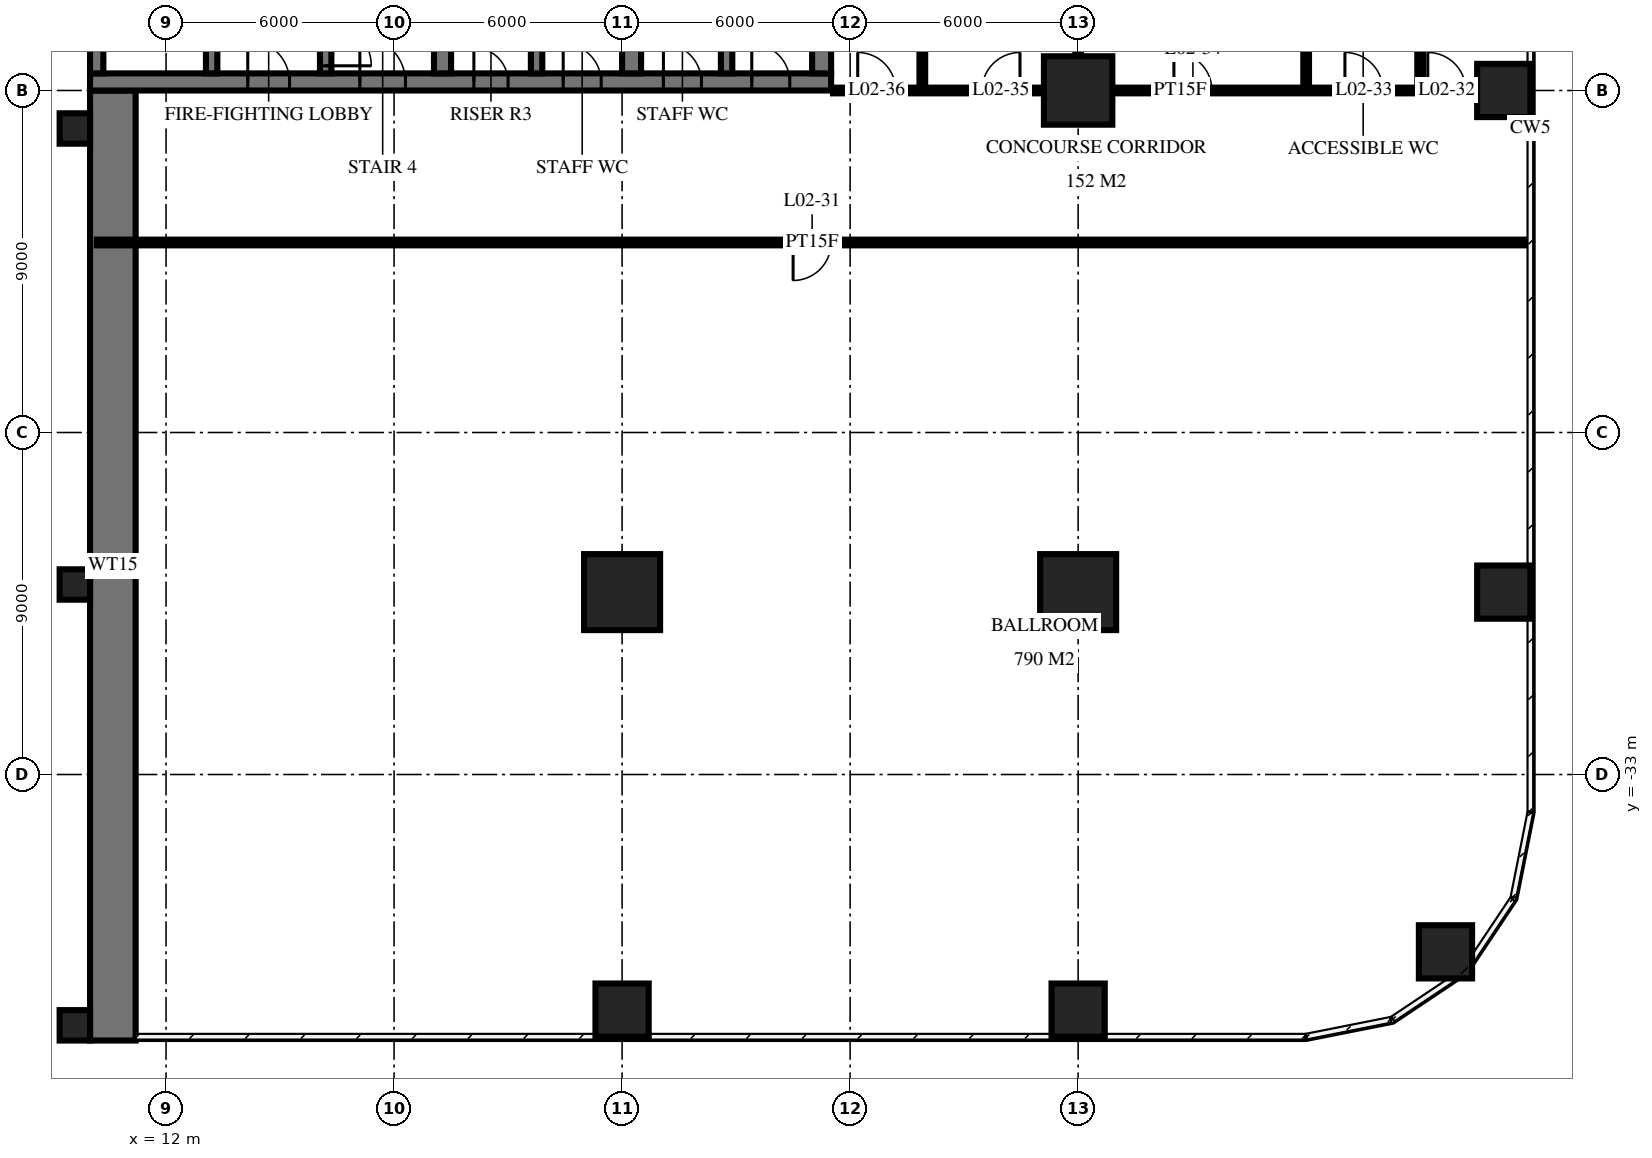
"""IFC4 building model, lengths in metres.
Left out: names, types, materials, properties, quantities, classifications, styles, units other than length and angle.
Written with IfcOpenShell. Run it as: python <this file> out.ifc"""

import sys

from ifc_helpers import new_model, si_unit, direction, frame, frame_2d, origin, origin_2d, place, context, subcontext, project, spatial, rectangle, circle, extrude, element, fill, save


model = new_model("IFC4")
c1 = context("Model", 3, precision=1e-05, world=origin(), true_north=direction((0.0, 1.0)))
c2 = subcontext(c1, "Body", "Model", "MODEL_VIEW")
j1 = project(units=[si_unit("LENGTHUNIT", "METRE"), si_unit("PLANEANGLEUNIT", "RADIAN")], contexts=[c1])
p1 = place(None, origin())
s1 = spatial("IfcSite", under=j1, at=p1, CompositionType="ELEMENT")
p2 = place(p1, origin())
s2 = spatial("IfcBuilding", under=s1, at=p2, CompositionType="ELEMENT")
p3 = place(p2, frame((0.0, 0.0, 12.5)))
s3 = spatial("IfcBuildingStorey", under=s2, at=p3, CompositionType="ELEMENT", Elevation=12.5)
p4 = place(p3, frame((24.0, -39.2, 0.0), z_axis=(0.0, 0.0, 1.0), x_axis=(1.0, 0.0, 0.0)))
e1 = element("IfcColumn", 1, at=p4, inside=s3, PredefinedType="COLUMN", context=c2, shape_type="SweptSolid", body=[
    extrude(circle(Radius=0.7, at=origin_2d()), origin(), (0.0, 0.0, 1.0), 5.5),
])
p5 = place(p3, frame((24.0, -28.2, 0.0), z_axis=(0.0, 0.0, 1.0), x_axis=(1.0, 0.0, 0.0)))
e2 = element("IfcColumn", 2, at=p5, inside=s3, PredefinedType="COLUMN", context=c2, shape_type="SweptSolid", body=[
    extrude(circle(Radius=1.0, at=origin_2d()), origin(), (0.0, 0.0, 1.0), 5.5),
])
p6 = place(p3, frame((36.0, -39.2, 0.0), z_axis=(0.0, 0.0, 1.0), x_axis=(1.0, 0.0, 0.0)))
e3 = element("IfcColumn", 3, at=p6, inside=s3, PredefinedType="COLUMN", context=c2, shape_type="SweptSolid", body=[
    extrude(circle(Radius=0.7, at=origin_2d()), origin(), (0.0, 0.0, 1.0), 5.5),
])
p7 = place(p3, frame((36.0, -28.2, 0.0), z_axis=(0.0, 0.0, 1.0), x_axis=(1.0, 0.0, 0.0)))
e4 = element("IfcColumn", 4, at=p7, inside=s3, PredefinedType="COLUMN", context=c2, shape_type="SweptSolid", body=[
    extrude(circle(Radius=1.0, at=origin_2d()), origin(), (0.0, 0.0, 1.0), 5.5),
])
p8 = place(p3, frame((36.0, -15.0, 0.0), z_axis=(0.0, 0.0, 1.0), x_axis=(1.0, 0.0, 0.0)))
e5 = element("IfcColumn", 5, at=p8, inside=s3, PredefinedType="COLUMN", context=c2, shape_type="SweptSolid", body=[
    extrude(circle(Radius=0.9, at=origin_2d()), origin(), (0.0, 0.0, 1.0), 5.5),
])
for number, where, z_axis, x_axis in (
    (6, (45.666, -37.666, 0.0), (0.0, 0.0, 1.0), (1.0, 0.0, 0.0)),
    (7, (47.2, -28.2, 0.0), (0.0, 0.0, 1.0), (1.0, 0.0, 0.0)),
    (8, (47.2, -15.0, 0.0), (0.0, 0.0, 1.0), (1.0, 0.0, 0.0)),
):
    element("IfcColumn", number, at=place(p3, frame(where, z_axis=z_axis, x_axis=x_axis)), inside=s3, PredefinedType="COLUMN", context=c2, shape_type="SweptSolid", body=[
        extrude(circle(Radius=0.7, at=origin_2d()), origin(), (0.0, 0.0, 1.0), 5.5),
    ])
p9 = place(p3, frame((10.0, -14.775, 0.0), z_axis=(0.0, 0.0, 1.0), x_axis=(1.0, 0.0, 0.0)))
e9 = element("IfcWall", 9, at=p9, inside=s3, PredefinedType="SHEAR", context=c2, shape_type="SweptSolid", body=[
    extrude(rectangle(XDim=19.5, YDim=0.45, at=frame_2d((9.75, 0.0))), origin(), (0.0, 0.0, 1.0), 5.5),
])
p10 = place(p9, frame((7.1, 0.0, 0.0)))
e10 = element("IfcOpeningElement", 10, at=p10, cuts=e9, PredefinedType="OPENING", context=c2, shape_type="SweptSolid", body=[
    extrude(rectangle(XDim=1.2, YDim=2.1, at=frame_2d((0.6, 1.05))), frame((0.0, 0.235, 0.0), z_axis=(0.0, -1.0, 0.0), x_axis=(1.0, 0.0, 0.0)), (0.0, 0.0, 1.0), 0.47),
])
p11 = place(p9, frame((4.15, 0.0, 0.0)))
e11 = element("IfcOpeningElement", 11, at=p11, cuts=e9, PredefinedType="OPENING", context=c2, shape_type="SweptSolid", body=[
    extrude(rectangle(XDim=1.1, YDim=2.1, at=frame_2d((0.55, 1.05))), frame((0.0, 0.235, 0.0), z_axis=(0.0, -1.0, 0.0), x_axis=(1.0, 0.0, 0.0)), (0.0, 0.0, 1.0), 0.47),
])
p12 = place(p9, frame((10.1, 0.0, 0.0)))
e12 = element("IfcOpeningElement", 12, at=p12, cuts=e9, PredefinedType="OPENING", context=c2, shape_type="SweptSolid", body=[
    extrude(rectangle(XDim=0.9, YDim=2.1, at=frame_2d((0.45, 1.05))), frame((0.0, 0.235, 0.0), z_axis=(0.0, -1.0, 0.0), x_axis=(1.0, 0.0, 0.0)), (0.0, 0.0, 1.0), 0.47),
])
p13 = place(p9, frame((12.45, 0.0, 0.0)))
e13 = element("IfcOpeningElement", 13, at=p13, cuts=e9, PredefinedType="OPENING", context=c2, shape_type="SweptSolid", body=[
    extrude(rectangle(XDim=1.0, YDim=2.1, at=frame_2d((0.5, 1.05))), frame((0.0, 0.235, 0.0), z_axis=(0.0, -1.0, 0.0), x_axis=(1.0, 0.0, 0.0)), (0.0, 0.0, 1.0), 0.47),
])
p14 = place(p9, frame((15.087, 0.0, 0.0)))
e14 = element("IfcOpeningElement", 14, at=p14, cuts=e9, PredefinedType="OPENING", context=c2, shape_type="SweptSolid", body=[
    extrude(rectangle(XDim=1.0, YDim=2.1, at=frame_2d((0.5, 1.05))), frame((0.0, 0.235, 0.0), z_axis=(0.0, -1.0, 0.0), x_axis=(1.0, 0.0, 0.0)), (0.0, 0.0, 1.0), 0.47),
])
p15 = place(p9, frame((17.413, 0.0, 0.0)))
e15 = element("IfcOpeningElement", 15, at=p15, cuts=e9, PredefinedType="OPENING", context=c2, shape_type="SweptSolid", body=[
    extrude(rectangle(XDim=1.0, YDim=2.1, at=frame_2d((0.5, 1.05))), frame((0.0, 0.235, 0.0), z_axis=(0.0, -1.0, 0.0), x_axis=(1.0, 0.0, 0.0)), (0.0, 0.0, 1.0), 0.47),
])
p16 = place(p3, frame((10.175, -14.55, 0.0), z_axis=(0.0, 0.0, 1.0), x_axis=(0.0, 1.0, 0.0)))
e16 = element("IfcWall", 16, at=p16, inside=s3, PredefinedType="SHEAR", context=c2, shape_type="SweptSolid", body=[
    extrude(rectangle(XDim=14.1, YDim=0.35, at=frame_2d((7.05, 0.0))), origin(), (0.0, 0.0, 1.0), 5.5),
])
p17 = place(p3, frame((29.25, -14.55, 0.0), z_axis=(0.0, 0.0, 1.0), x_axis=(0.0, 1.0, 0.0)))
e17 = element("IfcWall", 17, at=p17, inside=s3, PredefinedType="SHEAR", context=c2, shape_type="SweptSolid", body=[
    extrude(rectangle(XDim=14.1, YDim=0.5, at=frame_2d((7.05, 0.0))), origin(), (0.0, 0.0, 1.0), 5.5),
])
p18 = place(p17, frame((8.4, 0.0, 0.0)))
e18 = element("IfcOpeningElement", 18, at=p18, cuts=e17, PredefinedType="OPENING", context=c2, shape_type="SweptSolid", body=[
    extrude(rectangle(XDim=1.4, YDim=2.4, at=frame_2d((0.7, 1.2))), frame((0.0, 0.26, 0.0), z_axis=(0.0, -1.0, 0.0), x_axis=(1.0, 0.0, 0.0)), (0.0, 0.0, 1.0), 0.52),
])
p19 = place(p17, frame((10.0, 0.0, 0.0)))
e19 = element("IfcOpeningElement", 19, at=p19, cuts=e17, PredefinedType="OPENING", context=c2, shape_type="SweptSolid", body=[
    extrude(rectangle(XDim=1.4, YDim=2.4, at=frame_2d((0.7, 1.2))), frame((0.0, 0.26, 0.0), z_axis=(0.0, -1.0, 0.0), x_axis=(1.0, 0.0, 0.0)), (0.0, 0.0, 1.0), 0.52),
])
p20 = place(p3, frame((13.2, -14.55, 0.0), z_axis=(0.0, 0.0, 1.0), x_axis=(0.0, 1.0, 0.0)))
e20 = element("IfcWall", 20, at=p20, inside=s3, PredefinedType="SHEAR", context=c2, shape_type="SweptSolid", body=[
    extrude(rectangle(XDim=5.4, YDim=0.3, at=frame_2d((2.7, 0.0))), origin(), (0.0, 0.0, 1.0), 5.5),
])
p21 = place(p20, frame((4.0, 0.0, 0.0)))
e21 = element("IfcOpeningElement", 21, at=p21, cuts=e20, PredefinedType="OPENING", context=c2, shape_type="SweptSolid", body=[
    extrude(rectangle(XDim=1.2, YDim=2.1, at=frame_2d((0.6, 1.05))), frame((0.0, 0.16, 0.0), z_axis=(0.0, -1.0, 0.0), x_axis=(1.0, 0.0, 0.0)), (0.0, 0.0, 1.0), 0.32),
])
p22 = place(p3, frame((16.2, -14.55, 0.0), z_axis=(0.0, 0.0, 1.0), x_axis=(0.0, 1.0, 0.0)))
e22 = element("IfcWall", 22, at=p22, inside=s3, PredefinedType="SHEAR", context=c2, shape_type="SweptSolid", body=[
    extrude(rectangle(XDim=5.4, YDim=0.3, at=frame_2d((2.7, 0.0))), origin(), (0.0, 0.0, 1.0), 5.5),
])
p23 = place(p22, frame((0.2, 0.0, 0.0)))
e23 = element("IfcOpeningElement", 23, at=p23, cuts=e22, PredefinedType="OPENING", context=c2, shape_type="SweptSolid", body=[
    extrude(rectangle(XDim=1.2, YDim=2.1, at=frame_2d((0.6, 1.05))), frame((0.0, 0.16, 0.0), z_axis=(0.0, -1.0, 0.0), x_axis=(1.0, 0.0, 0.0)), (0.0, 0.0, 1.0), 0.32),
])
p24 = place(p3, frame((19.275, -14.55, 0.0), z_axis=(0.0, 0.0, 1.0), x_axis=(0.0, 1.0, 0.0)))
e24 = element("IfcWall", 24, at=p24, inside=s3, PredefinedType="SHEAR", context=c2, shape_type="SweptSolid", body=[
    extrude(rectangle(XDim=5.4, YDim=0.45, at=frame_2d((2.7, 0.0))), origin(), (0.0, 0.0, 1.0), 5.5),
])
p25 = place(p3, frame((21.75, -14.55, 0.0), z_axis=(0.0, 0.0, 1.0), x_axis=(0.0, 1.0, 0.0)))
e25 = element("IfcWall", 25, at=p25, inside=s3, PredefinedType="SHEAR", context=c2, shape_type="SweptSolid", body=[
    extrude(rectangle(XDim=5.4, YDim=0.3, at=frame_2d((2.7, 0.0))), origin(), (0.0, 0.0, 1.0), 5.5),
])
p26 = place(p3, frame((24.25, -14.55, 0.0), z_axis=(0.0, 0.0, 1.0), x_axis=(0.0, 1.0, 0.0)))
e26 = element("IfcWall", 26, at=p26, inside=s3, PredefinedType="SHEAR", context=c2, shape_type="SweptSolid", body=[
    extrude(rectangle(XDim=5.4, YDim=0.5, at=frame_2d((2.7, 0.0))), origin(), (0.0, 0.0, 1.0), 5.5),
])
p27 = place(p3, frame((26.75, -14.55, 0.0), z_axis=(0.0, 0.0, 1.0), x_axis=(0.0, 1.0, 0.0)))
e27 = element("IfcWall", 27, at=p27, inside=s3, PredefinedType="SHEAR", context=c2, shape_type="SweptSolid", body=[
    extrude(rectangle(XDim=5.4, YDim=0.3, at=frame_2d((2.7, 0.0))), origin(), (0.0, 0.0, 1.0), 5.5),
])
p28 = place(p3, frame((10.6, -40.0, 0.0), z_axis=(0.0, 0.0, 1.0), x_axis=(0.0, 1.0, 0.0)))
e28 = element("IfcWall", 28, at=p28, inside=s3, PredefinedType="SHEAR", context=c2, shape_type="SweptSolid", body=[
    extrude(rectangle(XDim=25.0, YDim=1.2, at=frame_2d((12.5, 0.0))), origin(), (0.0, 0.0, 1.0), 5.5),
])
for number, where, z_axis, x_axis in (
    (29, (9.6, -39.6, 0.0), (0.0, 0.0, 1.0), (1.0, 0.0, 0.0)),
    (30, (9.6, -28.0, 0.0), (0.0, 0.0, 1.0), (1.0, 0.0, 0.0)),
    (31, (9.6, -16.0, 0.0), (0.0, 0.0, 1.0), (1.0, 0.0, 0.0)),
):
    element("IfcColumn", number, at=place(p3, frame(where, z_axis=z_axis, x_axis=x_axis)), inside=s3, PredefinedType="COLUMN", context=c2, shape_type="SweptSolid", body=[
        extrude(rectangle(XDim=0.8, YDim=0.8, at=origin_2d()), origin(), (0.0, 0.0, 1.0), 4.25),
    ])
p29 = place(p3, frame((45.0, -15.0, 0.0), z_axis=(0.0, 0.0, 1.0), x_axis=(0.0, 1.0, 0.0)))
e32 = element("IfcWall", 32, at=p29, inside=s3, PredefinedType="PLUMBINGWALL", context=c2, shape_type="SweptSolid", body=[
    extrude(rectangle(XDim=6.0, YDim=0.15, at=frame_2d((3.0, 0.0))), origin(), (0.0, 0.0, 1.0), 5.05),
])
p30 = place(p3, frame((42.0, -15.0, 0.0), z_axis=(0.0, 0.0, 1.0), x_axis=(0.0, 1.0, 0.0)))
e33 = element("IfcWall", 33, at=p30, inside=s3, PredefinedType="PLUMBINGWALL", context=c2, shape_type="SweptSolid", body=[
    extrude(rectangle(XDim=4.5, YDim=0.15, at=frame_2d((2.25, 0.0))), origin(), (0.0, 0.0, 1.0), 5.05),
])
p31 = place(p3, frame((36.0, -15.0, 0.0), z_axis=(0.0, 0.0, 1.0), x_axis=(0.0, 1.0, 0.0)))
e34 = element("IfcWall", 34, at=p31, inside=s3, PredefinedType="PARTITIONING", context=c2, shape_type="SweptSolid", body=[
    extrude(rectangle(XDim=22.82, YDim=0.15, at=frame_2d((11.41, 0.0))), origin(), (0.0, 0.0, 1.0), 5.05),
])
p32 = place(p3, frame((31.9, -15.0, 0.0), z_axis=(0.0, 0.0, 1.0), x_axis=(0.0, 1.0, 0.0)))
e35 = element("IfcWall", 35, at=p32, inside=s3, PredefinedType="PARTITIONING", context=c2, shape_type="SweptSolid", body=[
    extrude(rectangle(XDim=12.5, YDim=0.15, at=frame_2d((6.25, 0.0))), origin(), (0.0, 0.0, 1.0), 5.05),
])
p33 = place(p3, frame((10.18, -19.0, 0.0), z_axis=(0.0, 0.0, 1.0), x_axis=(1.0, 0.0, 0.0)))
e36 = element("IfcWall", 36, at=p33, inside=s3, PredefinedType="PARTITIONING", context=c2, shape_type="SweptSolid", body=[
    extrude(rectangle(XDim=37.64, YDim=0.15, at=frame_2d((18.82, 0.0))), origin(), (0.0, 0.0, 1.0), 5.05),
])
p34 = place(p33, frame((18.32, 0.0, 0.0)))
e37 = element("IfcOpeningElement", 37, at=p34, cuts=e36, PredefinedType="OPENING", context=c2, shape_type="SweptSolid", body=[
    extrude(rectangle(XDim=1.0, YDim=2.1, at=frame_2d((0.5, 1.05))), frame((0.0, 0.085, 0.0), z_axis=(0.0, -1.0, 0.0), x_axis=(1.0, 0.0, 0.0)), (0.0, 0.0, 1.0), 0.17),
])
p35 = place(p3, frame((29.55, -15.0, 0.0), z_axis=(0.0, 0.0, 1.0), x_axis=(1.0, 0.0, 0.0)))
e38 = element("IfcWall", 38, at=p35, inside=s3, PredefinedType="PARTITIONING", context=c2, shape_type="SweptSolid", body=[
    extrude(rectangle(XDim=18.27, YDim=0.15, at=frame_2d((9.135, 0.0))), origin(), (0.0, 0.0, 1.0), 5.05),
])
p36 = place(p35, frame((15.65, 0.0, 0.0)))
e39 = element("IfcOpeningElement", 39, at=p36, cuts=e38, PredefinedType="OPENING", context=c2, shape_type="SweptSolid", body=[
    extrude(rectangle(XDim=1.0, YDim=2.1, at=frame_2d((0.5, 1.05))), frame((0.0, 0.085, 0.0), z_axis=(0.0, -1.0, 0.0), x_axis=(1.0, 0.0, 0.0)), (0.0, 0.0, 1.0), 0.17),
])
p37 = place(p35, frame((13.47, 0.0, 0.0)))
e40 = element("IfcOpeningElement", 40, at=p37, cuts=e38, PredefinedType="OPENING", context=c2, shape_type="SweptSolid", body=[
    extrude(rectangle(XDim=1.0, YDim=2.1, at=frame_2d((0.5, 1.05))), frame((0.0, 0.085, 0.0), z_axis=(0.0, -1.0, 0.0), x_axis=(1.0, 0.0, 0.0)), (0.0, 0.0, 1.0), 0.17),
])
p38 = place(p35, frame((8.97, 0.0, 0.0)))
e41 = element("IfcOpeningElement", 41, at=p38, cuts=e38, PredefinedType="OPENING", context=c2, shape_type="SweptSolid", body=[
    extrude(rectangle(XDim=1.0, YDim=2.1, at=frame_2d((0.5, 1.05))), frame((0.0, 0.085, 0.0), z_axis=(0.0, -1.0, 0.0), x_axis=(1.0, 0.0, 0.0)), (0.0, 0.0, 1.0), 0.17),
])
p39 = place(p35, frame((3.92, 0.0, 0.0)))
e42 = element("IfcOpeningElement", 42, at=p39, cuts=e38, PredefinedType="OPENING", context=c2, shape_type="SweptSolid", body=[
    extrude(rectangle(XDim=1.0, YDim=2.1, at=frame_2d((0.5, 1.05))), frame((0.0, 0.085, 0.0), z_axis=(0.0, -1.0, 0.0), x_axis=(1.0, 0.0, 0.0)), (0.0, 0.0, 1.0), 0.17),
])
p40 = place(p35, frame((0.65, 0.0, 0.0)))
e43 = element("IfcOpeningElement", 43, at=p40, cuts=e38, PredefinedType="OPENING", context=c2, shape_type="SweptSolid", body=[
    extrude(rectangle(XDim=1.0, YDim=2.1, at=frame_2d((0.5, 1.05))), frame((0.0, 0.085, 0.0), z_axis=(0.0, -1.0, 0.0), x_axis=(1.0, 0.0, 0.0)), (0.0, 0.0, 1.0), 0.17),
])
p41 = place(p10, origin())
e44 = element("IfcDoor", 44, at=p41, inside=s3, OperationType="SINGLE_SWING_RIGHT", PredefinedType="DOOR", context=c2, shape_type="SweptSolid", body=[
    extrude(rectangle(XDim=1.2, YDim=2.1, at=frame_2d((0.6, 1.05))), frame((0.0, 0.025, 0.0), z_axis=(0.0, -1.0, 0.0), x_axis=(1.0, 0.0, 0.0)), (0.0, 0.0, 1.0), 0.05),
])
fill(e10, e44)
p42 = place(p11, origin())
e45 = element("IfcDoor", 45, at=p42, inside=s3, OperationType="SINGLE_SWING_RIGHT", PredefinedType="DOOR", context=c2, shape_type="SweptSolid", body=[
    extrude(rectangle(XDim=1.1, YDim=2.1, at=frame_2d((0.55, 1.05))), frame((0.0, 0.025, 0.0), z_axis=(0.0, -1.0, 0.0), x_axis=(1.0, 0.0, 0.0)), (0.0, 0.0, 1.0), 0.05),
])
fill(e11, e45)
p43 = place(p12, origin())
e46 = element("IfcDoor", 46, at=p43, inside=s3, OperationType="SINGLE_SWING_RIGHT", PredefinedType="DOOR", context=c2, shape_type="SweptSolid", body=[
    extrude(rectangle(XDim=0.9, YDim=2.1, at=frame_2d((0.45, 1.05))), frame((0.0, 0.025, 0.0), z_axis=(0.0, -1.0, 0.0), x_axis=(1.0, 0.0, 0.0)), (0.0, 0.0, 1.0), 0.05),
])
fill(e12, e46)
p44 = place(p13, origin())
e47 = element("IfcDoor", 47, at=p44, inside=s3, OperationType="SINGLE_SWING_RIGHT", PredefinedType="DOOR", context=c2, shape_type="SweptSolid", body=[
    extrude(rectangle(XDim=1.0, YDim=2.1, at=frame_2d((0.5, 1.05))), frame((0.0, 0.025, 0.0), z_axis=(0.0, -1.0, 0.0), x_axis=(1.0, 0.0, 0.0)), (0.0, 0.0, 1.0), 0.05),
])
fill(e13, e47)
p45 = place(p14, origin())
e48 = element("IfcDoor", 48, at=p45, inside=s3, OperationType="SINGLE_SWING_RIGHT", PredefinedType="DOOR", context=c2, shape_type="SweptSolid", body=[
    extrude(rectangle(XDim=1.0, YDim=2.1, at=frame_2d((0.5, 1.05))), frame((0.0, 0.025, 0.0), z_axis=(0.0, -1.0, 0.0), x_axis=(1.0, 0.0, 0.0)), (0.0, 0.0, 1.0), 0.05),
])
fill(e14, e48)
p46 = place(p15, origin())
e49 = element("IfcDoor", 49, at=p46, inside=s3, OperationType="SINGLE_SWING_RIGHT", PredefinedType="DOOR", context=c2, shape_type="SweptSolid", body=[
    extrude(rectangle(XDim=1.0, YDim=2.1, at=frame_2d((0.5, 1.05))), frame((0.0, 0.025, 0.0), z_axis=(0.0, -1.0, 0.0), x_axis=(1.0, 0.0, 0.0)), (0.0, 0.0, 1.0), 0.05),
])
fill(e15, e49)
p47 = place(p23, frame((0.6, 0.0, 0.0), z_axis=(0.0, 0.0, 1.0), x_axis=(-1.0, 0.0, 0.0)))
e50 = element("IfcDoor", 50, at=p47, inside=s3, OperationType="SINGLE_SWING_LEFT", PredefinedType="DOOR", context=c2, shape_type="SweptSolid", body=[
    extrude(rectangle(XDim=1.2, YDim=2.1, at=frame_2d((0.0, 1.05))), frame((0.0, -0.025, 0.0), z_axis=(0.0, 1.0, 0.0), x_axis=(-1.0, 0.0, 0.0)), (0.0, 0.0, 1.0), 0.05),
])
fill(e23, e50)
p48 = place(p34, frame((0.5, 0.0, 0.0), z_axis=(0.0, 0.0, 1.0), x_axis=(-1.0, 0.0, 0.0)))
e51 = element("IfcDoor", 51, at=p48, inside=s3, OperationType="SINGLE_SWING_LEFT", PredefinedType="DOOR", context=c2, shape_type="SweptSolid", body=[
    extrude(rectangle(XDim=1.0, YDim=2.1, at=frame_2d((0.0, 1.05))), frame((0.0, -0.025, 0.0), z_axis=(0.0, 1.0, 0.0), x_axis=(-1.0, 0.0, 0.0)), (0.0, 0.0, 1.0), 0.05),
])
fill(e37, e51)
p49 = place(p36, origin())
e52 = element("IfcDoor", 52, at=p49, inside=s3, OperationType="SINGLE_SWING_RIGHT", PredefinedType="DOOR", context=c2, shape_type="SweptSolid", body=[
    extrude(rectangle(XDim=1.0, YDim=2.1, at=frame_2d((0.5, 1.05))), frame((0.0, 0.025, 0.0), z_axis=(0.0, -1.0, 0.0), x_axis=(1.0, 0.0, 0.0)), (0.0, 0.0, 1.0), 0.05),
])
fill(e39, e52)
p50 = place(p37, origin())
e53 = element("IfcDoor", 53, at=p50, inside=s3, OperationType="SINGLE_SWING_RIGHT", PredefinedType="DOOR", context=c2, shape_type="SweptSolid", body=[
    extrude(rectangle(XDim=1.0, YDim=2.1, at=frame_2d((0.5, 1.05))), frame((0.0, 0.025, 0.0), z_axis=(0.0, -1.0, 0.0), x_axis=(1.0, 0.0, 0.0)), (0.0, 0.0, 1.0), 0.05),
])
fill(e40, e53)
p51 = place(p38, origin())
e54 = element("IfcDoor", 54, at=p51, inside=s3, OperationType="SINGLE_SWING_RIGHT", PredefinedType="DOOR", context=c2, shape_type="SweptSolid", body=[
    extrude(rectangle(XDim=1.0, YDim=2.1, at=frame_2d((0.5, 1.05))), frame((0.0, 0.025, 0.0), z_axis=(0.0, -1.0, 0.0), x_axis=(1.0, 0.0, 0.0)), (0.0, 0.0, 1.0), 0.05),
])
fill(e41, e54)
p52 = place(p39, origin())
e55 = element("IfcDoor", 55, at=p52, inside=s3, OperationType="SINGLE_SWING_LEFT", PredefinedType="DOOR", context=c2, shape_type="SweptSolid", body=[
    extrude(rectangle(XDim=1.0, YDim=2.1, at=frame_2d((0.5, 1.05))), frame((0.0, 0.025, 0.0), z_axis=(0.0, -1.0, 0.0), x_axis=(1.0, 0.0, 0.0)), (0.0, 0.0, 1.0), 0.05),
])
fill(e42, e55)
p53 = place(p40, origin())
e56 = element("IfcDoor", 56, at=p53, inside=s3, OperationType="SINGLE_SWING_RIGHT", PredefinedType="DOOR", context=c2, shape_type="SweptSolid", body=[
    extrude(rectangle(XDim=1.0, YDim=2.1, at=frame_2d((0.5, 1.05))), frame((0.0, 0.025, 0.0), z_axis=(0.0, -1.0, 0.0), x_axis=(1.0, 0.0, 0.0)), (0.0, 0.0, 1.0), 0.05),
])
fill(e43, e56)
save(model, sys.argv[1])
